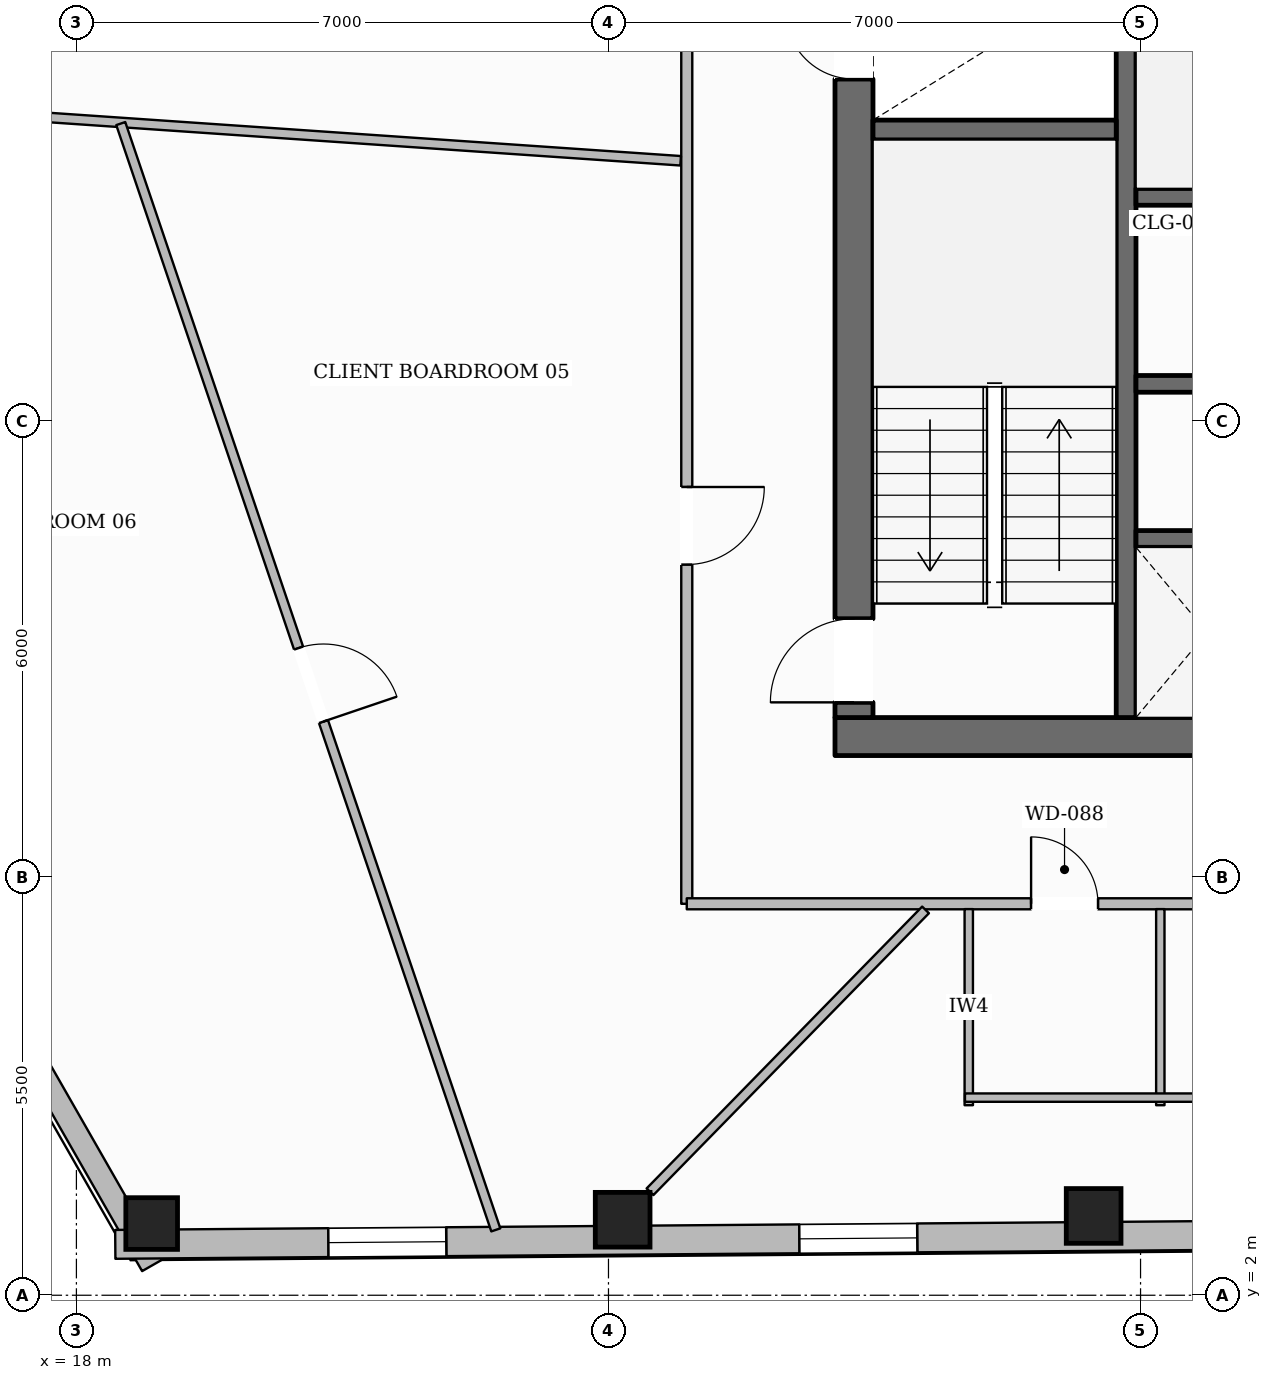
"""IFC4 building model, lengths in metres.
Left out: names, types, materials, properties, quantities, classifications, styles, units other than length and angle.
Written with IfcOpenShell. Run it as: python <this file> out.ifc"""

import sys

from ifc_helpers import new_model, si_unit, direction, frame, frame_2d, origin, origin_2d, place, context, subcontext, project, spatial, rectangle, hollow_rectangle, extrude, element, fill, save


model = new_model("IFC4")
c1 = context("Model", 3, precision=1e-05, world=origin(), true_north=direction((0.0, 1.0)))
c2 = subcontext(c1, "Body", "Model", "MODEL_VIEW")
j1 = project(units=[si_unit("LENGTHUNIT", "METRE"), si_unit("PLANEANGLEUNIT", "RADIAN")], contexts=[c1])
p1 = place(None, origin())
s1 = spatial("IfcSite", under=j1, at=p1, CompositionType="ELEMENT")
p2 = place(p1, origin())
s2 = spatial("IfcBuilding", under=s1, at=p2, CompositionType="ELEMENT")
p3 = place(p2, frame((0.0, 0.0, 147.1)))
s3 = spatial("IfcBuildingStorey", under=s2, at=p3, CompositionType="ELEMENT", Elevation=147.1)
p4 = place(p3, frame((27.98, 9.35, 0.0), z_axis=(0.0, 0.0, 1.0), x_axis=(1.0, 0.0, 0.0)))
e1 = element("IfcWall", 1, at=p4, inside=s3, PredefinedType="SOLIDWALL", context=c2, shape_type="SweptSolid", body=[
    extrude(rectangle(XDim=20.04, YDim=0.5, at=frame_2d((10.02, 0.0))), origin(), (0.0, 0.0, 1.0), 3.6),
])
p5 = place(p4, frame((10.52, 0.0, 0.0)))
e2 = element("IfcOpeningElement", 2, at=p5, cuts=e1, PredefinedType="OPENING", context=c2, shape_type="SweptSolid", body=[
    extrude(rectangle(XDim=1.4, YDim=2.2, at=frame_2d((0.7, 1.1))), frame((0.0, 0.26, 0.0), z_axis=(0.0, -1.0, 0.0), x_axis=(1.0, 0.0, 0.0)), (0.0, 0.0, 1.0), 0.52),
])
p6 = place(p3, frame((28.23, 9.6, 0.0), z_axis=(0.0, 0.0, 1.0), x_axis=(0.0, 1.0, 0.0)))
e3 = element("IfcWall", 3, at=p6, inside=s3, PredefinedType="SOLIDWALL", context=c2, shape_type="SweptSolid", body=[
    extrude(rectangle(XDim=13.0, YDim=0.5, at=frame_2d((6.5, 0.0))), origin(), (0.0, 0.0, 1.0), 3.6),
])
p7 = place(p6, frame((0.2, 0.0, 0.0)))
e4 = element("IfcOpeningElement", 4, at=p7, cuts=e3, PredefinedType="OPENING", context=c2, shape_type="SweptSolid", body=[
    extrude(rectangle(XDim=1.1, YDim=2.15, at=frame_2d((0.55, 1.075))), frame((0.0, 0.26, 0.0), z_axis=(0.0, -1.0, 0.0), x_axis=(1.0, 0.0, 0.0)), (0.0, 0.0, 1.0), 0.52),
])
p8 = place(p6, frame((8.4, 0.0, 0.0)))
e5 = element("IfcOpeningElement", 5, at=p8, cuts=e3, PredefinedType="OPENING", context=c2, shape_type="SweptSolid", body=[
    extrude(rectangle(XDim=0.9, YDim=2.1, at=frame_2d((0.45, 1.05))), frame((0.0, 0.26, 0.0), z_axis=(0.0, -1.0, 0.0), x_axis=(1.0, 0.0, 0.0)), (0.0, 0.0, 1.0), 0.52),
])
p9 = place(p3, frame((31.81, 9.6, 0.0), z_axis=(0.0, 0.0, 1.0), x_axis=(0.0, 1.0, 0.0)))
e6 = element("IfcWall", 6, at=p9, inside=s3, PredefinedType="SHEAR", context=c2, shape_type="SweptSolid", body=[
    extrude(rectangle(XDim=13.0, YDim=0.26, at=frame_2d((6.5, 0.0))), origin(), (0.0, 0.0, 1.0), 3.6),
])
p10 = place(p9, frame((10.925, 0.0, 0.0)))
e7 = element("IfcOpeningElement", 7, at=p10, cuts=e6, PredefinedType="OPENING", context=c2, shape_type="SweptSolid", body=[
    extrude(rectangle(XDim=1.25, YDim=2.25, at=frame_2d((0.625, 1.125))), frame((0.0, 0.14, 0.0), z_axis=(0.0, -1.0, 0.0), x_axis=(1.0, 0.0, 0.0)), (0.0, 0.0, 1.0), 0.28),
])
p11 = place(p3, frame((28.48, 17.33, 0.0), z_axis=(0.0, 0.0, 1.0), x_axis=(1.0, 0.0, 0.0)))
e8 = element("IfcWall", 8, at=p11, inside=s3, PredefinedType="SHEAR", context=c2, shape_type="SweptSolid", body=[
    extrude(rectangle(XDim=3.2, YDim=0.26, at=frame_2d((1.6, 0.0))), origin(), (0.0, 0.0, 1.0), 3.6),
])
p12 = place(p3, frame((31.94, 16.45, 0.0), z_axis=(0.0, 0.0, 1.0), x_axis=(1.0, 0.0, 0.0)))
e9 = element("IfcWall", 9, at=p12, inside=s3, PredefinedType="SOLIDWALL", context=c2, shape_type="SweptSolid", body=[
    extrude(rectangle(XDim=12.12, YDim=0.22, at=frame_2d((6.06, 0.0))), origin(), (0.0, 0.0, 1.0), 3.6),
])
p13 = place(p3, frame((31.94, 13.99, 0.0), z_axis=(0.0, 0.0, 1.0), x_axis=(1.0, 0.0, 0.0)))
e10 = element("IfcWall", 10, at=p13, inside=s3, PredefinedType="SOLIDWALL", context=c2, shape_type="SweptSolid", body=[
    extrude(rectangle(XDim=12.12, YDim=0.22, at=frame_2d((6.06, 0.0))), origin(), (0.0, 0.0, 1.0), 3.6),
])
p14 = place(p13, frame((1.21, 0.0, 0.0)))
e11 = element("IfcOpeningElement", 11, at=p14, cuts=e10, PredefinedType="OPENING", context=c2, shape_type="SweptSolid", body=[
    extrude(rectangle(XDim=0.9, YDim=2.1, at=frame_2d((0.45, 1.05))), frame((0.0, 0.12, 0.0), z_axis=(0.0, -1.0, 0.0), x_axis=(1.0, 0.0, 0.0)), (0.0, 0.0, 1.0), 0.24),
])
p15 = place(p13, frame((4.31, 0.0, 0.0)))
e12 = element("IfcOpeningElement", 12, at=p15, cuts=e10, PredefinedType="OPENING", context=c2, shape_type="SweptSolid", body=[
    extrude(rectangle(XDim=0.9, YDim=2.1, at=frame_2d((0.45, 1.05))), frame((0.0, 0.12, 0.0), z_axis=(0.0, -1.0, 0.0), x_axis=(1.0, 0.0, 0.0)), (0.0, 0.0, 1.0), 0.24),
])
p16 = place(p13, frame((6.535, 0.0, 0.0)))
e13 = element("IfcOpeningElement", 13, at=p16, cuts=e10, PredefinedType="OPENING", context=c2, shape_type="SweptSolid", body=[
    extrude(rectangle(XDim=1.1, YDim=2.2, at=frame_2d((0.55, 1.1))), frame((0.0, 0.12, 0.0), z_axis=(0.0, -1.0, 0.0), x_axis=(1.0, 0.0, 0.0)), (0.0, 0.0, 1.0), 0.24),
])
p17 = place(p13, frame((8.585, 0.0, 0.0)))
e14 = element("IfcOpeningElement", 14, at=p17, cuts=e10, PredefinedType="OPENING", context=c2, shape_type="SweptSolid", body=[
    extrude(rectangle(XDim=1.1, YDim=2.2, at=frame_2d((0.55, 1.1))), frame((0.0, 0.12, 0.0), z_axis=(0.0, -1.0, 0.0), x_axis=(1.0, 0.0, 0.0)), (0.0, 0.0, 1.0), 0.24),
])
p18 = place(p13, frame((10.635, 0.0, 0.0)))
e15 = element("IfcOpeningElement", 15, at=p18, cuts=e10, PredefinedType="OPENING", context=c2, shape_type="SweptSolid", body=[
    extrude(rectangle(XDim=1.1, YDim=2.2, at=frame_2d((0.55, 1.1))), frame((0.0, 0.12, 0.0), z_axis=(0.0, -1.0, 0.0), x_axis=(1.0, 0.0, 0.0)), (0.0, 0.0, 1.0), 0.24),
])
p19 = place(p3, frame((31.94, 11.95, 0.0), z_axis=(0.0, 0.0, 1.0), x_axis=(1.0, 0.0, 0.0)))
e16 = element("IfcWall", 16, at=p19, inside=s3, PredefinedType="SOLIDWALL", context=c2, shape_type="SweptSolid", body=[
    extrude(rectangle(XDim=6.19, YDim=0.22, at=frame_2d((3.095, 0.0))), origin(), (0.0, 0.0, 1.0), 3.6),
])
p20 = place(p3, frame((18.99, 2.943, 0.0), z_axis=(0.0, 0.0, 1.0), x_axis=(1.0, 0.0, 0.0)))
e17 = element("IfcColumn", 17, at=p20, inside=s3, PredefinedType="COLUMN", context=c2, shape_type="SweptSolid", body=[
    extrude(hollow_rectangle(XDim=0.68, YDim=0.68, WallThickness=0.03, at=origin_2d()), origin(), (0.0, 0.0, 1.0), 3.6),
])
for number, where, z_axis, x_axis in (
    (18, (25.187, 2.993, 0.0), (0.0, 0.0, 1.0), (1.0, 0.0, 0.0)),
    (19, (31.383, 3.043, 0.0), (0.0, 0.0, 1.0), (1.0, 0.0, 0.0)),
):
    element("IfcColumn", number, at=place(p3, frame(where, z_axis=z_axis, x_axis=x_axis)), inside=s3, PredefinedType="COLUMN", context=c2, shape_type="SweptSolid", body=[
        extrude(hollow_rectangle(XDim=0.72, YDim=0.72, WallThickness=0.032, at=origin_2d()), origin(), (0.0, 0.0, 1.0), 3.6),
    ])
p21 = place(p3, frame((13.248, 11.879, 0.0), z_axis=(0.0, 0.0, 1.0), x_axis=(0.503467320033, 0.864014269361, 0.0)))
e20 = element("IfcWall", 20, at=p21, inside=s3, PredefinedType="STANDARD", context=c2, shape_type="SweptSolid", body=[
    extrude(rectangle(XDim=38.396, YDim=0.38, at=frame_2d((19.198, 0.0))), origin(), (0.0, 0.0, 1.0), 3.059),
])
p22 = place(p21, frame((34.027, 0.0, 0.65)))
e21 = element("IfcOpeningElement", 21, at=p22, cuts=e20, PredefinedType="OPENING", context=c2, shape_type="SweptSolid", body=[
    extrude(rectangle(XDim=1.55, YDim=1.75, at=frame_2d((0.775, 0.875))), frame((0.0, 0.2, 0.0), z_axis=(0.0, -1.0, 0.0), x_axis=(1.0, 0.0, 0.0)), (0.0, 0.0, 1.0), 0.4),
])
p23 = place(p21, frame((27.786, 0.0, 0.65)))
e22 = element("IfcOpeningElement", 22, at=p23, cuts=e20, PredefinedType="OPENING", context=c2, shape_type="SweptSolid", body=[
    extrude(rectangle(XDim=1.55, YDim=1.75, at=frame_2d((0.775, 0.875))), frame((0.0, 0.2, 0.0), z_axis=(0.0, -1.0, 0.0), x_axis=(1.0, 0.0, 0.0)), (0.0, 0.0, 1.0), 0.4),
])
p24 = place(p21, frame((15.304, 0.0, 0.65)))
e23 = element("IfcOpeningElement", 23, at=p24, cuts=e20, PredefinedType="OPENING", context=c2, shape_type="SweptSolid", body=[
    extrude(rectangle(XDim=1.55, YDim=1.75, at=frame_2d((0.775, 0.875))), frame((0.0, 0.2, 0.0), z_axis=(0.0, -1.0, 0.0), x_axis=(1.0, 0.0, 0.0)), (0.0, 0.0, 1.0), 0.4),
])
p25 = place(p21, frame((9.063, 0.0, 0.65)))
e24 = element("IfcOpeningElement", 24, at=p25, cuts=e20, PredefinedType="OPENING", context=c2, shape_type="SweptSolid", body=[
    extrude(rectangle(XDim=1.55, YDim=1.75, at=frame_2d((0.775, 0.875))), frame((0.0, 0.2, 0.0), z_axis=(0.0, -1.0, 0.0), x_axis=(1.0, 0.0, 0.0)), (0.0, 0.0, 1.0), 0.4),
])
p26 = place(p21, frame((2.823, 0.0, 0.65)))
e25 = element("IfcOpeningElement", 25, at=p26, cuts=e20, PredefinedType="OPENING", context=c2, shape_type="SweptSolid", body=[
    extrude(rectangle(XDim=1.55, YDim=1.75, at=frame_2d((0.775, 0.875))), frame((0.0, 0.2, 0.0), z_axis=(0.0, -1.0, 0.0), x_axis=(1.0, 0.0, 0.0)), (0.0, 0.0, 1.0), 0.4),
])
p27 = place(p3, frame((18.995, 2.392, 0.0), z_axis=(0.0, 0.0, 1.0), x_axis=(-0.496472938296, 0.868052199778, 0.0)))
e26 = element("IfcWall", 26, at=p27, inside=s3, PredefinedType="STANDARD", context=c2, shape_type="SweptSolid", body=[
    extrude(rectangle(XDim=11.57, YDim=0.3, at=frame_2d((5.785, 0.0))), origin(), (0.0, 0.0, 1.0), 3.059),
])
p28 = place(p27, frame((5.185, 0.0, 0.65)))
e27 = element("IfcOpeningElement", 27, at=p28, cuts=e26, PredefinedType="OPENING", context=c2, shape_type="SweptSolid", body=[
    extrude(rectangle(XDim=1.2, YDim=1.7, at=frame_2d((0.6, 0.85))), frame((0.0, 0.16, 0.0), z_axis=(0.0, -1.0, 0.0), x_axis=(1.0, 0.0, 0.0)), (0.0, 0.0, 1.0), 0.32),
])
p29 = place(p3, frame((56.643, 2.977, 0.0), z_axis=(0.0, 0.0, 1.0), x_axis=(-0.999967461722, -0.008066938573, 0.0)))
e28 = element("IfcWall", 28, at=p29, inside=s3, PredefinedType="STANDARD", context=c2, shape_type="SweptSolid", body=[
    extrude(rectangle(XDim=38.133, YDim=0.38, at=frame_2d((19.066, 0.0))), origin(), (0.0, 0.0, 1.0), 3.059),
])
p30 = place(p29, frame((33.779, 0.0, 0.65)))
e29 = element("IfcOpeningElement", 29, at=p30, cuts=e28, PredefinedType="OPENING", context=c2, shape_type="SweptSolid", body=[
    extrude(rectangle(XDim=1.55, YDim=1.75, at=frame_2d((0.775, 0.875))), frame((0.0, 0.2, 0.0), z_axis=(0.0, -1.0, 0.0), x_axis=(1.0, 0.0, 0.0)), (0.0, 0.0, 1.0), 0.4),
])
p31 = place(p29, frame((27.583, 0.0, 0.65)))
e30 = element("IfcOpeningElement", 30, at=p31, cuts=e28, PredefinedType="OPENING", context=c2, shape_type="SweptSolid", body=[
    extrude(rectangle(XDim=1.55, YDim=1.75, at=frame_2d((0.775, 0.875))), frame((0.0, 0.2, 0.0), z_axis=(0.0, -1.0, 0.0), x_axis=(1.0, 0.0, 0.0)), (0.0, 0.0, 1.0), 0.4),
])
p32 = place(p29, frame((15.189, 0.0, 0.65)))
e31 = element("IfcOpeningElement", 31, at=p32, cuts=e28, PredefinedType="OPENING", context=c2, shape_type="SweptSolid", body=[
    extrude(rectangle(XDim=1.55, YDim=1.75, at=frame_2d((0.775, 0.875))), frame((0.0, 0.2, 0.0), z_axis=(0.0, -1.0, 0.0), x_axis=(1.0, 0.0, 0.0)), (0.0, 0.0, 1.0), 0.4),
])
p33 = place(p29, frame((8.993, 0.0, 0.65)))
e32 = element("IfcOpeningElement", 32, at=p33, cuts=e28, PredefinedType="OPENING", context=c2, shape_type="SweptSolid", body=[
    extrude(rectangle(XDim=1.55, YDim=1.75, at=frame_2d((0.775, 0.875))), frame((0.0, 0.2, 0.0), z_axis=(0.0, -1.0, 0.0), x_axis=(1.0, 0.0, 0.0)), (0.0, 0.0, 1.0), 0.4),
])
p34 = place(p29, frame((2.796, 0.0, 0.65)))
e33 = element("IfcOpeningElement", 33, at=p34, cuts=e28, PredefinedType="OPENING", context=c2, shape_type="SweptSolid", body=[
    extrude(rectangle(XDim=1.55, YDim=1.75, at=frame_2d((0.775, 0.875))), frame((0.0, 0.2, 0.0), z_axis=(0.0, -1.0, 0.0), x_axis=(1.0, 0.0, 0.0)), (0.0, 0.0, 1.0), 0.4),
])
p35 = place(p3, frame((26.03, 25.05, 0.0), z_axis=(0.0, 0.0, 1.0), x_axis=(0.0, -1.0, 0.0)))
e34 = element("IfcWall", 34, at=p35, inside=s3, PredefinedType="PARTITIONING", context=c2, shape_type="SweptSolid", body=[
    extrude(rectangle(XDim=17.9, YDim=0.145, at=frame_2d((8.95, 0.0))), origin(), (0.0, 0.0, 1.0), 3.288),
])
p36 = place(p35, frame((3.638, 0.0, 0.0)))
e35 = element("IfcOpeningElement", 35, at=p36, cuts=e34, PredefinedType="OPENING", context=c2, shape_type="SweptSolid", body=[
    extrude(rectangle(XDim=1.02, YDim=2.15, at=frame_2d((0.51, 1.075))), frame((0.0, 0.083, 0.0), z_axis=(0.0, -1.0, 0.0), x_axis=(1.0, 0.0, 0.0)), (0.0, 0.0, 1.0), 0.165),
])
p37 = place(p35, frame((12.417, 0.0, 0.0)))
e36 = element("IfcOpeningElement", 36, at=p37, cuts=e34, PredefinedType="OPENING", context=c2, shape_type="SweptSolid", body=[
    extrude(rectangle(XDim=1.02, YDim=2.15, at=frame_2d((0.51, 1.075))), frame((0.0, 0.083, 0.0), z_axis=(0.0, -1.0, 0.0), x_axis=(1.0, 0.0, 0.0)), (0.0, 0.0, 1.0), 0.165),
])
p38 = place(p3, frame((26.03, 7.15, 0.0), z_axis=(0.0, 0.0, 1.0), x_axis=(1.0, 0.0, 0.0)))
e37 = element("IfcWall", 37, at=p38, inside=s3, PredefinedType="PARTITIONING", context=c2, shape_type="SweptSolid", body=[
    extrude(rectangle(XDim=23.94, YDim=0.145, at=frame_2d((11.97, 0.0))), origin(), (0.0, 0.0, 1.0), 3.6),
])
p39 = place(p38, frame((4.53, 0.0, 0.0)))
e38 = element("IfcOpeningElement", 38, at=p39, cuts=e37, PredefinedType="OPENING", context=c2, shape_type="SweptSolid", body=[
    extrude(rectangle(XDim=0.88, YDim=2.1, at=frame_2d((0.44, 1.05))), frame((0.0, 0.083, 0.0), z_axis=(0.0, -1.0, 0.0), x_axis=(1.0, 0.0, 0.0)), (0.0, 0.0, 1.0), 0.165),
])
p40 = place(p38, frame((7.05, 0.0, 0.0)))
e39 = element("IfcOpeningElement", 39, at=p40, cuts=e37, PredefinedType="OPENING", context=c2, shape_type="SweptSolid", body=[
    extrude(rectangle(XDim=0.88, YDim=2.1, at=frame_2d((0.44, 1.05))), frame((0.0, 0.083, 0.0), z_axis=(0.0, -1.0, 0.0), x_axis=(1.0, 0.0, 0.0)), (0.0, 0.0, 1.0), 0.165),
])
p41 = place(p38, frame((9.43, 0.0, 0.0)))
e40 = element("IfcOpeningElement", 40, at=p41, cuts=e37, PredefinedType="OPENING", context=c2, shape_type="SweptSolid", body=[
    extrude(rectangle(XDim=0.96, YDim=2.1, at=frame_2d((0.48, 1.05))), frame((0.0, 0.083, 0.0), z_axis=(0.0, -1.0, 0.0), x_axis=(1.0, 0.0, 0.0)), (0.0, 0.0, 1.0), 0.165),
])
for number, where, z_axis, x_axis in (
    (41, (29.74, 4.5, 0.0), (0.0, 0.0, 1.0), (0.0, 1.0, 0.0)),
    (42, (32.26, 4.5, 0.0), (0.0, 0.0, 1.0), (0.0, 1.0, 0.0)),
):
    element("IfcWall", number, at=place(p3, frame(where, z_axis=z_axis, x_axis=x_axis)), inside=s3, PredefinedType="PLUMBINGWALL", context=c2, shape_type="SweptSolid", body=[
        extrude(rectangle(XDim=2.58, YDim=0.11, at=frame_2d((1.29, 0.0))), origin(), (0.0, 0.0, 1.0), 3.6),
    ])
p42 = place(p3, frame((29.69, 4.6, 0.0), z_axis=(0.0, 0.0, 1.0), x_axis=(1.0, 0.0, 0.0)))
e43 = element("IfcWall", 43, at=p42, inside=s3, PredefinedType="PLUMBINGWALL", context=c2, shape_type="SweptSolid", body=[
    extrude(rectangle(XDim=7.46, YDim=0.11, at=frame_2d((3.73, 0.0))), origin(), (0.0, 0.0, 1.0), 3.6),
])
p43 = place(p3, frame((25.949, 16.925, 0.0), z_axis=(0.0, 0.0, 1.0), x_axis=(-0.997662095491, 0.06833990942, 0.0)))
e44 = element("IfcWall", 44, at=p43, inside=s3, PredefinedType="PARTITIONING", context=c2, shape_type="SweptSolid", body=[
    extrude(rectangle(XDim=8.738, YDim=0.125, at=frame_2d((4.369, 0.0))), origin(), (0.0, 0.0, 1.0), 3.141),
])
p44 = place(p3, frame((29.171, 7.07, 0.0), z_axis=(0.0, 0.0, 1.0), x_axis=(-0.69905826228, -0.715064714511, 0.0)))
e45 = element("IfcWall", 45, at=p44, inside=s3, PredefinedType="PARTITIONING", context=c2, shape_type="SweptSolid", body=[
    extrude(rectangle(XDim=5.186, YDim=0.125, at=frame_2d((2.593, 0.0))), origin(), (0.0, 0.0, 1.0), 3.6),
])
p45 = place(p3, frame((18.583, 17.415, 0.0), z_axis=(0.0, 0.0, 1.0), x_axis=(0.321056186339, -0.947060148678, 0.0)))
e46 = element("IfcWall", 46, at=p45, inside=s3, PredefinedType="PARTITIONING", context=c2, shape_type="SweptSolid", body=[
    extrude(rectangle(XDim=15.368, YDim=0.125, at=frame_2d((7.684, 0.0))), origin(), (0.0, 0.0, 1.0), 3.6),
])
p46 = place(p45, frame((7.287, 0.0, 0.0)))
e47 = element("IfcOpeningElement", 47, at=p46, cuts=e46, PredefinedType="OPENING", context=c2, shape_type="SweptSolid", body=[
    extrude(rectangle(XDim=1.02, YDim=2.15, at=frame_2d((0.51, 1.075))), frame((0.0, 0.073, 0.0), z_axis=(0.0, -1.0, 0.0), x_axis=(1.0, 0.0, 0.0)), (0.0, 0.0, 1.0), 0.145),
])
p47 = place(p30, origin())
e48 = element("IfcWindow", 48, at=p47, inside=s3, PartitioningType="SINGLE_PANEL", PredefinedType="WINDOW", context=c2, shape_type="SweptSolid", body=[
    extrude(rectangle(XDim=1.55, YDim=1.75, at=frame_2d((0.775, 0.875))), frame((0.0, 0.03, 0.0), z_axis=(0.0, -1.0, 0.0), x_axis=(1.0, 0.0, 0.0)), (0.0, 0.0, 1.0), 0.06),
])
fill(e29, e48)
p48 = place(p31, origin())
e49 = element("IfcWindow", 49, at=p48, inside=s3, PartitioningType="SINGLE_PANEL", PredefinedType="WINDOW", context=c2, shape_type="SweptSolid", body=[
    extrude(rectangle(XDim=1.55, YDim=1.75, at=frame_2d((0.775, 0.875))), frame((0.0, 0.03, 0.0), z_axis=(0.0, -1.0, 0.0), x_axis=(1.0, 0.0, 0.0)), (0.0, 0.0, 1.0), 0.06),
])
fill(e30, e49)
p49 = place(p7, origin())
e50 = element("IfcDoor", 50, at=p49, inside=s3, OperationType="SINGLE_SWING_LEFT", PredefinedType="DOOR", context=c2, shape_type="SweptSolid", body=[
    extrude(rectangle(XDim=1.1, YDim=2.15, at=frame_2d((0.55, 1.075))), frame((0.0, 0.025, 0.0), z_axis=(0.0, -1.0, 0.0), x_axis=(1.0, 0.0, 0.0)), (0.0, 0.0, 1.0), 0.05),
])
fill(e4, e50)
p50 = place(p8, origin())
e51 = element("IfcDoor", 51, at=p50, inside=s3, OperationType="SINGLE_SWING_RIGHT", PredefinedType="DOOR", context=c2, shape_type="SweptSolid", body=[
    extrude(rectangle(XDim=0.9, YDim=2.1, at=frame_2d((0.45, 1.05))), frame((0.0, 0.025, 0.0), z_axis=(0.0, -1.0, 0.0), x_axis=(1.0, 0.0, 0.0)), (0.0, 0.0, 1.0), 0.05),
])
fill(e5, e51)
p51 = place(p39, origin())
e52 = element("IfcDoor", 52, at=p51, inside=s3, OperationType="SINGLE_SWING_LEFT", PredefinedType="DOOR", context=c2, shape_type="SweptSolid", body=[
    extrude(rectangle(XDim=0.88, YDim=2.1, at=frame_2d((0.44, 1.05))), frame((0.0, 0.025, 0.0), z_axis=(0.0, -1.0, 0.0), x_axis=(1.0, 0.0, 0.0)), (0.0, 0.0, 1.0), 0.05),
])
fill(e38, e52)
p52 = place(p37, origin())
e53 = element("IfcDoor", 53, at=p52, inside=s3, OperationType="SINGLE_SWING_LEFT", PredefinedType="DOOR", context=c2, shape_type="SweptSolid", body=[
    extrude(rectangle(XDim=1.02, YDim=2.15, at=frame_2d((0.51, 1.075))), frame((0.0, 0.025, 0.0), z_axis=(0.0, -1.0, 0.0), x_axis=(1.0, 0.0, 0.0)), (0.0, 0.0, 1.0), 0.05),
])
fill(e36, e53)
p53 = place(p46, origin())
e54 = element("IfcDoor", 54, at=p53, inside=s3, OperationType="SINGLE_SWING_RIGHT", PredefinedType="DOOR", context=c2, shape_type="SweptSolid", body=[
    extrude(rectangle(XDim=1.02, YDim=2.15, at=frame_2d((0.51, 1.075))), frame((0.0, 0.025, 0.0), z_axis=(0.0, -1.0, 0.0), x_axis=(1.0, 0.0, 0.0)), (0.0, 0.0, 1.0), 0.05),
])
fill(e47, e54)
save(model, sys.argv[1])
